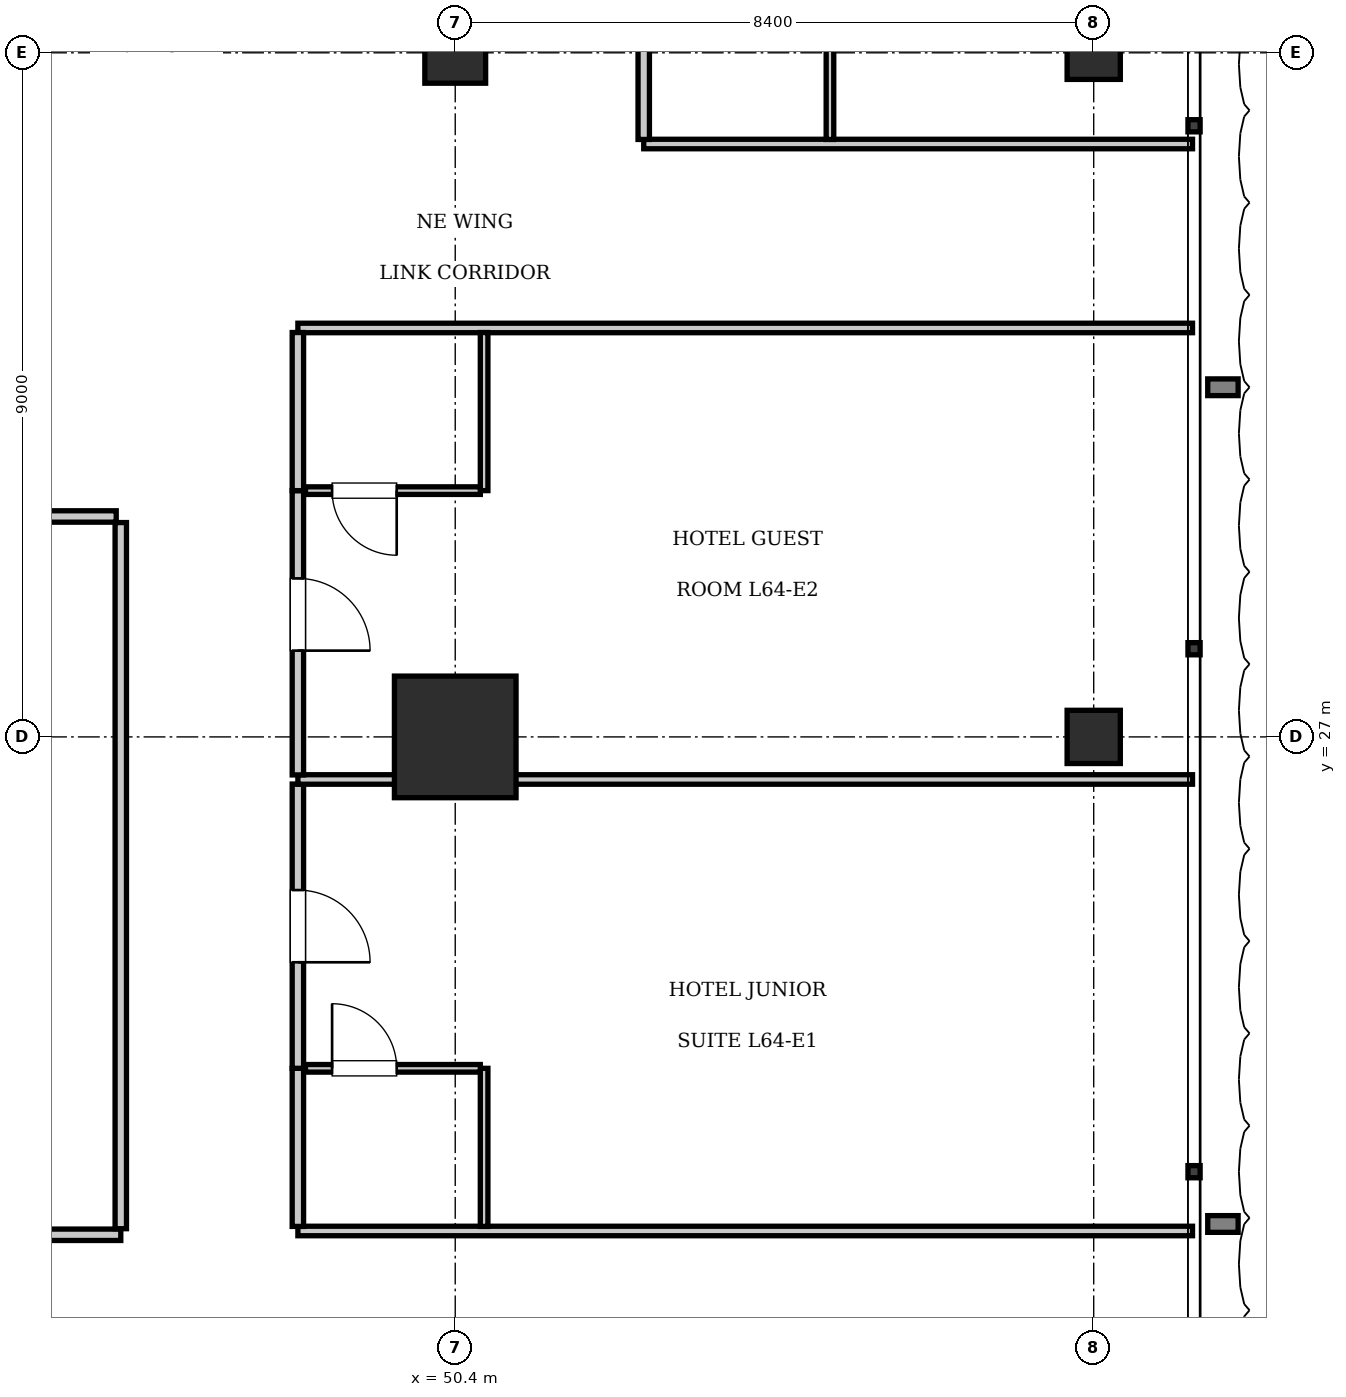
"""IFC4 building model, lengths in metres.
Left out: names, types, materials, properties, quantities, classifications, styles, units other than length and angle.
Written with IfcOpenShell. Run it as: python <this file> out.ifc"""

import sys

from ifc_helpers import new_model, si_unit, direction, frame, frame_2d, origin, origin_2d, place, context, subcontext, project, spatial, rectangle, extrude, element, fill, save


model = new_model("IFC4")
c1 = context("Model", 3, precision=1e-05, world=origin(), true_north=direction((0.0, 1.0)))
c2 = subcontext(c1, "Body", "Model", "MODEL_VIEW")
j1 = project(units=[si_unit("LENGTHUNIT", "METRE"), si_unit("PLANEANGLEUNIT", "RADIAN")], contexts=[c1])
p1 = place(None, origin())
s1 = spatial("IfcSite", under=j1, at=p1, CompositionType="ELEMENT")
p2 = place(p1, origin())
s2 = spatial("IfcBuilding", under=s1, at=p2, CompositionType="ELEMENT")
p3 = place(p2, frame((0.0, 0.0, 262.5)))
s3 = spatial("IfcBuildingStorey", under=s2, at=p3, CompositionType="ELEMENT", Elevation=262.5)
p4 = place(p3, frame((50.4, 27.0, 0.0), z_axis=(0.0, 0.0, 1.0), x_axis=(1.0, 0.0, 0.0)))
e1 = element("IfcColumn", 1, at=p4, inside=s3, PredefinedType="COLUMN", context=c2, shape_type="SweptSolid", body=[
    extrude(rectangle(XDim=1.6, YDim=1.6, at=origin_2d()), origin(), (0.0, 0.0, 1.0), 3.85),
])
p5 = place(p3, frame((50.4, 36.0, 0.0), z_axis=(0.0, 0.0, 1.0), x_axis=(1.0, 0.0, 0.0)))
e2 = element("IfcColumn", 2, at=p5, inside=s3, PredefinedType="COLUMN", context=c2, shape_type="SweptSolid", body=[
    extrude(rectangle(XDim=0.8, YDim=0.8, at=origin_2d()), origin(), (0.0, 0.0, 1.0), 3.85),
])
for number, where, z_axis, x_axis in (
    (3, (58.8, 27.0, 0.0), (0.0, 0.0, 1.0), (1.0, 0.0, 0.0)),
    (4, (58.8, 36.0, 0.0), (0.0, 0.0, 1.0), (1.0, 0.0, 0.0)),
):
    element("IfcColumn", number, at=place(p3, frame(where, z_axis=z_axis, x_axis=x_axis)), inside=s3, PredefinedType="COLUMN", context=c2, shape_type="SweptSolid", body=[
        extrude(rectangle(XDim=0.7, YDim=0.7, at=origin_2d()), origin(), (0.0, 0.0, 1.0), 3.85),
    ])
p6 = place(p3, frame((29.65, 20.45, 0.0), z_axis=(0.0, 0.0, 1.0), x_axis=(1.0, 0.0, 0.0)))
e5 = element("IfcWall", 5, at=p6, inside=s3, PredefinedType="PARTITIONING", context=c2, shape_type="SweptSolid", body=[
    extrude(rectangle(XDim=16.35, YDim=0.15, at=frame_2d((8.175, 0.0))), origin(), (0.0, 0.0, 1.0), 3.61),
])
p7 = place(p3, frame((46.0, 20.53, 0.0), z_axis=(0.0, 0.0, 1.0), x_axis=(0.0, 1.0, 0.0)))
e6 = element("IfcWall", 6, at=p7, inside=s3, PredefinedType="PARTITIONING", context=c2, shape_type="SweptSolid", body=[
    extrude(rectangle(XDim=9.29, YDim=0.15, at=frame_2d((4.645, 0.0))), origin(), (0.0, 0.0, 1.0), 3.61),
])
p8 = place(p3, frame((40.471, 29.9, 0.0), z_axis=(0.0, 0.0, 1.0), x_axis=(1.0, 0.0, 0.0)))
e7 = element("IfcWall", 7, at=p8, inside=s3, PredefinedType="PARTITIONING", context=c2, shape_type="SweptSolid", body=[
    extrude(rectangle(XDim=5.469, YDim=0.15, at=frame_2d((2.734, 0.0))), origin(), (0.0, 0.0, 1.0), 3.61),
])
p9 = place(p8, frame((2.284, 0.0, 0.0)))
e8 = element("IfcOpeningElement", 8, at=p9, cuts=e7, PredefinedType="OPENING", context=c2, shape_type="SweptSolid", body=[
    extrude(rectangle(XDim=0.9, YDim=2.1, at=frame_2d((0.45, 1.05))), frame((0.0, 0.085, 0.0), z_axis=(0.0, -1.0, 0.0), x_axis=(1.0, 0.0, 0.0)), (0.0, 0.0, 1.0), 0.17),
])
for number, where, z_axis, x_axis in (
    (9, (48.33, 20.5, 0.0), (0.0, 0.0, 1.0), (1.0, 0.0, 0.0)),
    (10, (48.33, 32.38, 0.0), (0.0, 0.0, 1.0), (1.0, 0.0, 0.0)),
):
    element("IfcWall", number, at=place(p3, frame(where, z_axis=z_axis, x_axis=x_axis)), inside=s3, PredefinedType="PARTITIONING", context=c2, shape_type="SweptSolid", body=[
        extrude(rectangle(XDim=11.77, YDim=0.125, at=frame_2d((5.885, 0.0))), origin(), (0.0, 0.0, 1.0), 3.61),
    ])
p10 = place(p3, frame((48.33, 20.56, 0.0), z_axis=(0.0, 0.0, 1.0), x_axis=(0.0, 1.0, 0.0)))
e11 = element("IfcWall", 11, at=p10, inside=s3, PredefinedType="PARTITIONING", context=c2, shape_type="SweptSolid", body=[
    extrude(rectangle(XDim=2.08, YDim=0.15, at=frame_2d((1.04, 0.0))), origin(), (0.0, 0.0, 1.0), 3.61),
])
p11 = place(p3, frame((48.33, 22.64, 0.0), z_axis=(0.0, 0.0, 1.0), x_axis=(0.0, 1.0, 0.0)))
e12 = element("IfcWall", 12, at=p11, inside=s3, PredefinedType="PARTITIONING", context=c2, shape_type="SweptSolid", body=[
    extrude(rectangle(XDim=3.74, YDim=0.15, at=frame_2d((1.87, 0.0))), origin(), (0.0, 0.0, 1.0), 3.61),
])
p12 = place(p11, frame((1.395, 0.0, 0.0)))
e13 = element("IfcOpeningElement", 13, at=p12, cuts=e12, PredefinedType="OPENING", context=c2, shape_type="SweptSolid", body=[
    extrude(rectangle(XDim=0.95, YDim=2.15, at=frame_2d((0.475, 1.075))), frame((0.0, 0.085, 0.0), z_axis=(0.0, -1.0, 0.0), x_axis=(1.0, 0.0, 0.0)), (0.0, 0.0, 1.0), 0.17),
])
p13 = place(p3, frame((50.78, 20.56, 0.0), z_axis=(0.0, 0.0, 1.0), x_axis=(0.0, 1.0, 0.0)))
e14 = element("IfcWall", 14, at=p13, inside=s3, PredefinedType="PARTITIONING", context=c2, shape_type="SweptSolid", body=[
    extrude(rectangle(XDim=2.08, YDim=0.1, at=frame_2d((1.04, 0.0))), origin(), (0.0, 0.0, 1.0), 3.61),
])
p14 = place(p3, frame((48.43, 22.64, 0.0), z_axis=(0.0, 0.0, 1.0), x_axis=(1.0, 0.0, 0.0)))
e15 = element("IfcWall", 15, at=p14, inside=s3, PredefinedType="PARTITIONING", context=c2, shape_type="SweptSolid", body=[
    extrude(rectangle(XDim=2.3, YDim=0.1, at=frame_2d((1.15, 0.0))), origin(), (0.0, 0.0, 1.0), 3.61),
])
p15 = place(p14, frame((0.35, 0.0, 0.0)))
e16 = element("IfcOpeningElement", 16, at=p15, cuts=e15, PredefinedType="OPENING", context=c2, shape_type="SweptSolid", body=[
    extrude(rectangle(XDim=0.85, YDim=2.1, at=frame_2d((0.425, 1.05))), frame((0.0, 0.06, 0.0), z_axis=(0.0, -1.0, 0.0), x_axis=(1.0, 0.0, 0.0)), (0.0, 0.0, 1.0), 0.12),
])
p16 = place(p3, frame((48.33, 26.44, 0.0), z_axis=(0.0, 0.0, 1.0), x_axis=(1.0, 0.0, 0.0)))
e17 = element("IfcWall", 17, at=p16, inside=s3, PredefinedType="PARTITIONING", context=c2, shape_type="SweptSolid", body=[
    extrude(rectangle(XDim=11.77, YDim=0.125, at=frame_2d((5.885, 0.0))), origin(), (0.0, 0.0, 1.0), 3.61),
])
p17 = place(p3, frame((48.33, 26.5, 0.0), z_axis=(0.0, 0.0, 1.0), x_axis=(0.0, 1.0, 0.0)))
e18 = element("IfcWall", 18, at=p17, inside=s3, PredefinedType="PARTITIONING", context=c2, shape_type="SweptSolid", body=[
    extrude(rectangle(XDim=3.74, YDim=0.15, at=frame_2d((1.87, 0.0))), origin(), (0.0, 0.0, 1.0), 3.61),
])
p18 = place(p17, frame((1.635, 0.0, 0.0)))
e19 = element("IfcOpeningElement", 19, at=p18, cuts=e18, PredefinedType="OPENING", context=c2, shape_type="SweptSolid", body=[
    extrude(rectangle(XDim=0.95, YDim=2.15, at=frame_2d((0.475, 1.075))), frame((0.0, 0.085, 0.0), z_axis=(0.0, -1.0, 0.0), x_axis=(1.0, 0.0, 0.0)), (0.0, 0.0, 1.0), 0.17),
])
p19 = place(p3, frame((48.33, 30.24, 0.0), z_axis=(0.0, 0.0, 1.0), x_axis=(0.0, 1.0, 0.0)))
e20 = element("IfcWall", 20, at=p19, inside=s3, PredefinedType="PARTITIONING", context=c2, shape_type="SweptSolid", body=[
    extrude(rectangle(XDim=2.08, YDim=0.15, at=frame_2d((1.04, 0.0))), origin(), (0.0, 0.0, 1.0), 3.61),
])
p20 = place(p3, frame((50.78, 30.24, 0.0), z_axis=(0.0, 0.0, 1.0), x_axis=(0.0, 1.0, 0.0)))
e21 = element("IfcWall", 21, at=p20, inside=s3, PredefinedType="PARTITIONING", context=c2, shape_type="SweptSolid", body=[
    extrude(rectangle(XDim=2.08, YDim=0.1, at=frame_2d((1.04, 0.0))), origin(), (0.0, 0.0, 1.0), 3.61),
])
p21 = place(p3, frame((48.43, 30.24, 0.0), z_axis=(0.0, 0.0, 1.0), x_axis=(1.0, 0.0, 0.0)))
e22 = element("IfcWall", 22, at=p21, inside=s3, PredefinedType="PARTITIONING", context=c2, shape_type="SweptSolid", body=[
    extrude(rectangle(XDim=2.3, YDim=0.1, at=frame_2d((1.15, 0.0))), origin(), (0.0, 0.0, 1.0), 3.61),
])
p22 = place(p21, frame((0.35, 0.0, 0.0)))
e23 = element("IfcOpeningElement", 23, at=p22, cuts=e22, PredefinedType="OPENING", context=c2, shape_type="SweptSolid", body=[
    extrude(rectangle(XDim=0.85, YDim=2.1, at=frame_2d((0.425, 1.05))), frame((0.0, 0.06, 0.0), z_axis=(0.0, -1.0, 0.0), x_axis=(1.0, 0.0, 0.0)), (0.0, 0.0, 1.0), 0.12),
])
p23 = place(p3, frame((52.88, 34.8, 0.0), z_axis=(0.0, 0.0, 1.0), x_axis=(1.0, 0.0, 0.0)))
e24 = element("IfcWall", 24, at=p23, inside=s3, PredefinedType="PARTITIONING", context=c2, shape_type="SweptSolid", body=[
    extrude(rectangle(XDim=7.22, YDim=0.125, at=frame_2d((3.61, 0.0))), origin(), (0.0, 0.0, 1.0), 3.61),
])
p24 = place(p3, frame((52.88, 34.86, 0.0), z_axis=(0.0, 0.0, 1.0), x_axis=(0.0, 1.0, 0.0)))
e25 = element("IfcWall", 25, at=p24, inside=s3, PredefinedType="PARTITIONING", context=c2, shape_type="SweptSolid", body=[
    extrude(rectangle(XDim=2.29, YDim=0.15, at=frame_2d((1.145, 0.0))), origin(), (0.0, 0.0, 1.0), 3.61),
])
p25 = place(p3, frame((55.33, 34.86, 0.0), z_axis=(0.0, 0.0, 1.0), x_axis=(0.0, 1.0, 0.0)))
e26 = element("IfcWall", 26, at=p25, inside=s3, PredefinedType="PARTITIONING", context=c2, shape_type="SweptSolid", body=[
    extrude(rectangle(XDim=2.29, YDim=0.1, at=frame_2d((1.145, 0.0))), origin(), (0.0, 0.0, 1.0), 3.61),
])
p26 = place(p15, origin())
e27 = element("IfcDoor", 27, at=p26, inside=s3, OperationType="SINGLE_SWING_LEFT", PredefinedType="DOOR", context=c2, shape_type="SweptSolid", body=[
    extrude(rectangle(XDim=0.85, YDim=2.1, at=frame_2d((0.425, 1.05))), frame((0.0, 0.025, 0.0), z_axis=(0.0, -1.0, 0.0), x_axis=(1.0, 0.0, 0.0)), (0.0, 0.0, 1.0), 0.05),
])
fill(e16, e27)
p27 = place(p12, frame((0.95, 0.0, 0.0), z_axis=(0.0, 0.0, 1.0), x_axis=(-1.0, 0.0, 0.0)))
e28 = element("IfcDoor", 28, at=p27, inside=s3, OperationType="SINGLE_SWING_RIGHT", PredefinedType="DOOR", context=c2, shape_type="SweptSolid", body=[
    extrude(rectangle(XDim=0.95, YDim=2.15, at=frame_2d((0.475, 1.075))), frame((0.0, 0.025, 0.0), z_axis=(0.0, -1.0, 0.0), x_axis=(1.0, 0.0, 0.0)), (0.0, 0.0, 1.0), 0.05),
])
fill(e13, e28)
p28 = place(p22, frame((0.85, 0.0, 0.0), z_axis=(0.0, 0.0, 1.0), x_axis=(-1.0, 0.0, 0.0)))
e29 = element("IfcDoor", 29, at=p28, inside=s3, OperationType="SINGLE_SWING_LEFT", PredefinedType="DOOR", context=c2, shape_type="SweptSolid", body=[
    extrude(rectangle(XDim=0.85, YDim=2.1, at=frame_2d((0.425, 1.05))), frame((0.0, 0.025, 0.0), z_axis=(0.0, -1.0, 0.0), x_axis=(1.0, 0.0, 0.0)), (0.0, 0.0, 1.0), 0.05),
])
fill(e23, e29)
p29 = place(p18, frame((0.95, 0.0, 0.0), z_axis=(0.0, 0.0, 1.0), x_axis=(-1.0, 0.0, 0.0)))
e30 = element("IfcDoor", 30, at=p29, inside=s3, OperationType="SINGLE_SWING_RIGHT", PredefinedType="DOOR", context=c2, shape_type="SweptSolid", body=[
    extrude(rectangle(XDim=0.95, YDim=2.15, at=frame_2d((0.475, 1.075))), frame((0.0, 0.025, 0.0), z_axis=(0.0, -1.0, 0.0), x_axis=(1.0, 0.0, 0.0)), (0.0, 0.0, 1.0), 0.05),
])
fill(e19, e30)
save(model, sys.argv[1])
